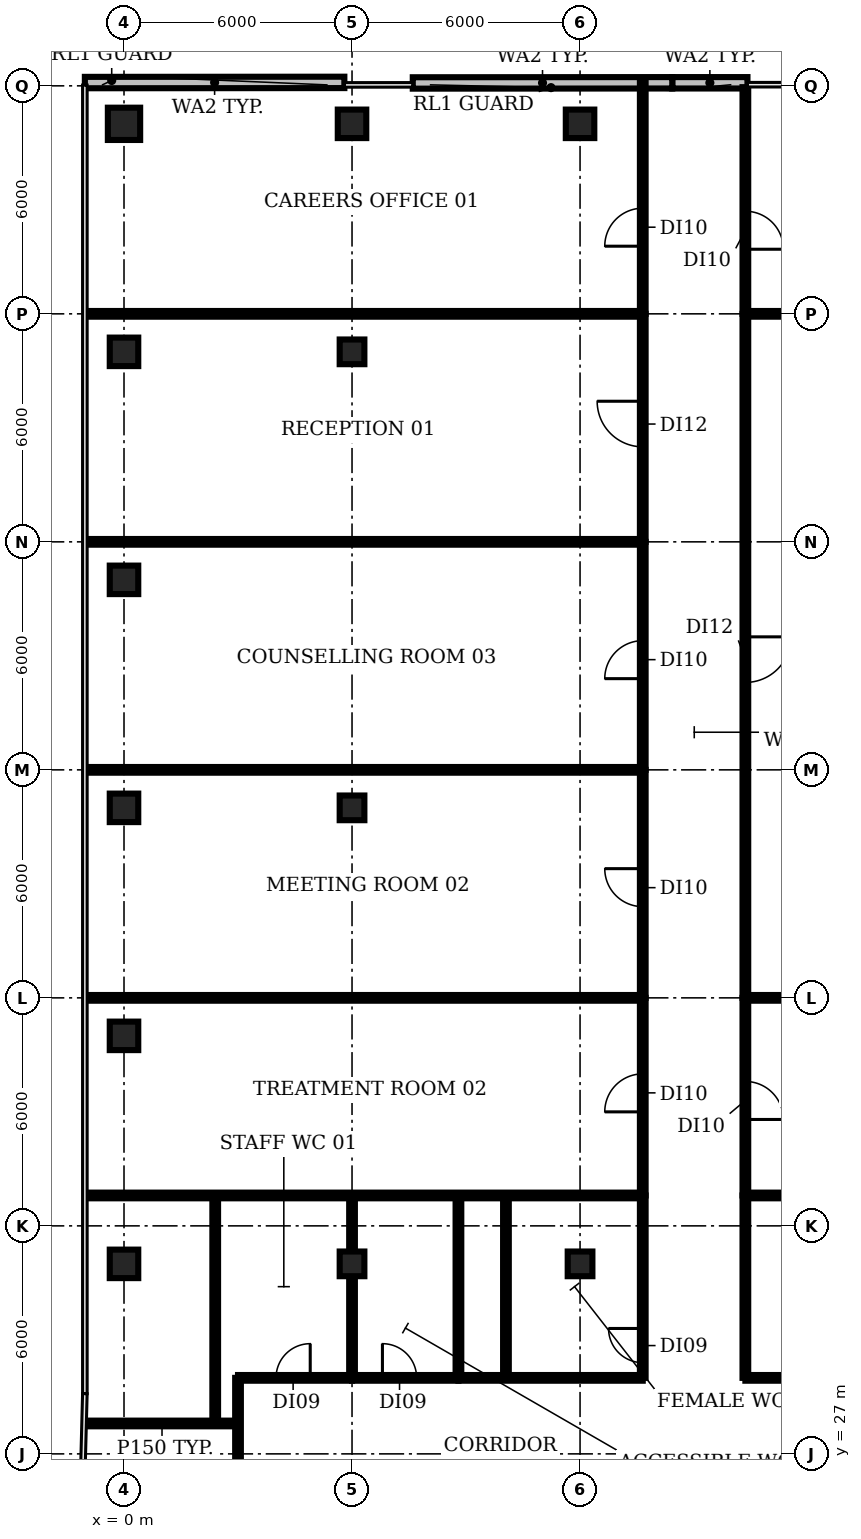
"""IFC4 building model, lengths in metres.
Left out: names, types, materials, properties, quantities, classifications, styles, units other than length and angle.
Written with IfcOpenShell. Run it as: python <this file> out.ifc"""

import sys

from ifc_helpers import new_model, si_unit, direction, frame, frame_2d, origin, origin_2d, place, context, subcontext, project, spatial, rectangle, circle, extrude, element, fill, save


model = new_model("IFC4")
c1 = context("Model", 3, precision=1e-05, world=origin(), true_north=direction((0.0, 1.0)))
c2 = subcontext(c1, "Body", "Model", "MODEL_VIEW")
j1 = project(units=[si_unit("LENGTHUNIT", "METRE"), si_unit("PLANEANGLEUNIT", "RADIAN")], contexts=[c1])
p1 = place(None, origin())
s1 = spatial("IfcSite", under=j1, at=p1, CompositionType="ELEMENT")
p2 = place(p1, origin())
s2 = spatial("IfcBuilding", under=s1, at=p2, CompositionType="ELEMENT")
p3 = place(p2, frame((0.0, 0.0, 281.0)))
s3 = spatial("IfcBuildingStorey", under=s2, at=p3, CompositionType="ELEMENT", Elevation=281.0)
for number, where, z_axis, x_axis in (
    (1, (0.0, 32.0, 0.0), (0.0, 0.0, 1.0), (1.0, 0.0, 0.0)),
    (2, (0.0, 38.0, 0.0), (0.0, 0.0, 1.0), (1.0, 0.0, 0.0)),
    (3, (0.0, 44.0, 0.0), (0.0, 0.0, 1.0), (1.0, 0.0, 0.0)),
    (4, (0.0, 50.0, 0.0), (0.0, 0.0, 1.0), (1.0, 0.0, 0.0)),
    (5, (0.0, 56.0, 0.0), (0.0, 0.0, 1.0), (1.0, 0.0, 0.0)),
):
    element("IfcColumn", number, at=place(p3, frame(where, z_axis=z_axis, x_axis=x_axis)), inside=s3, PredefinedType="COLUMN", context=c2, shape_type="SweptSolid", body=[
        extrude(rectangle(XDim=0.75, YDim=0.75, at=origin_2d()), origin(), (0.0, 0.0, 1.0), 3.85),
    ])
p4 = place(p3, frame((0.0, 62.0, 0.0), z_axis=(0.0, 0.0, 1.0), x_axis=(1.0, 0.0, 0.0)))
e6 = element("IfcColumn", 6, at=p4, inside=s3, PredefinedType="COLUMN", context=c2, shape_type="SweptSolid", body=[
    extrude(circle(Radius=0.425, at=origin_2d()), origin(), (0.0, 0.0, 1.0), 3.85),
])
for number, where, z_axis, x_axis in (
    (7, (6.0, 32.0, 0.0), (0.0, 0.0, 1.0), (1.0, 0.0, 0.0)),
    (8, (6.0, 44.0, 0.0), (0.0, 0.0, 1.0), (1.0, 0.0, 0.0)),
    (9, (6.0, 56.0, 0.0), (0.0, 0.0, 1.0), (1.0, 0.0, 0.0)),
):
    element("IfcColumn", number, at=place(p3, frame(where, z_axis=z_axis, x_axis=x_axis)), inside=s3, PredefinedType="COLUMN", context=c2, shape_type="SweptSolid", body=[
        extrude(rectangle(XDim=0.65, YDim=0.65, at=origin_2d()), origin(), (0.0, 0.0, 1.0), 3.85),
    ])
p5 = place(p3, frame((6.0, 62.0, 0.0), z_axis=(0.0, 0.0, 1.0), x_axis=(1.0, 0.0, 0.0)))
e10 = element("IfcColumn", 10, at=p5, inside=s3, PredefinedType="COLUMN", context=c2, shape_type="SweptSolid", body=[
    extrude(rectangle(XDim=0.75, YDim=0.75, at=origin_2d()), origin(), (0.0, 0.0, 1.0), 3.85),
])
p6 = place(p3, frame((12.0, 32.0, 0.0), z_axis=(0.0, 0.0, 1.0), x_axis=(1.0, 0.0, 0.0)))
e11 = element("IfcColumn", 11, at=p6, inside=s3, PredefinedType="COLUMN", context=c2, shape_type="SweptSolid", body=[
    extrude(rectangle(XDim=0.65, YDim=0.65, at=origin_2d()), origin(), (0.0, 0.0, 1.0), 3.85),
])
p7 = place(p3, frame((12.0, 62.0, 0.0), z_axis=(0.0, 0.0, 1.0), x_axis=(1.0, 0.0, 0.0)))
e12 = element("IfcColumn", 12, at=p7, inside=s3, PredefinedType="COLUMN", context=c2, shape_type="SweptSolid", body=[
    extrude(rectangle(XDim=0.75, YDim=0.75, at=origin_2d()), origin(), (0.0, 0.0, 1.0), 3.85),
])
p8 = place(p3, frame((16.405, 63.08, 0.0), z_axis=(0.0, 0.0, 1.0), x_axis=(-1.0, 0.0, 0.0)))
e13 = element("IfcWall", 13, at=p8, inside=s3, PredefinedType="SOLIDWALL", context=c2, shape_type="SweptSolid", body=[
    extrude(rectangle(XDim=1.979, YDim=0.3, at=frame_2d((0.989, 0.0))), origin(), (0.0, 0.0, 1.0), 3.85),
])
p9 = place(p3, frame((14.427, 63.08, 0.0), z_axis=(0.0, 0.0, 1.0), x_axis=(-0.999999792909, -0.000643569533, 0.0)))
e14 = element("IfcWall", 14, at=p9, inside=s3, PredefinedType="SOLIDWALL", context=c2, shape_type="SweptSolid", body=[
    extrude(rectangle(XDim=6.828, YDim=0.3, at=frame_2d((3.414, 0.0))), origin(), (0.0, 0.0, 1.0), 3.85),
])
p10 = place(p3, frame((5.798, 63.091, 0.0), z_axis=(0.0, 0.0, 1.0), x_axis=(-0.999999792894, -0.000643592544, 0.0)))
e15 = element("IfcWall", 15, at=p10, inside=s3, PredefinedType="SOLIDWALL", context=c2, shape_type="SweptSolid", body=[
    extrude(rectangle(XDim=6.828, YDim=0.3, at=frame_2d((3.414, 0.0))), origin(), (0.0, 0.0, 1.0), 3.85),
])
p11 = place(p3, frame((-1.0, 27.8, 0.0), z_axis=(0.0, 0.0, 1.0), x_axis=(1.0, 0.0, 0.0)))
e16 = element("IfcWall", 16, at=p11, inside=s3, PredefinedType="PARTITIONING", context=c2, shape_type="SweptSolid", body=[
    extrude(rectangle(XDim=4.0, YDim=0.15, at=frame_2d((2.0, 0.0))), origin(), (0.0, 0.0, 1.0), 2.9),
])
for number, where, z_axis, x_axis in (
    (17, (-0.98, 33.8, 0.0), (0.0, 0.0, 1.0), (1.0, 0.0, 0.0)),
    (18, (-0.98, 39.0, 0.0), (0.0, 0.0, 1.0), (1.0, 0.0, 0.0)),
    (19, (-0.98, 45.0, 0.0), (0.0, 0.0, 1.0), (1.0, 0.0, 0.0)),
    (20, (-0.98, 51.0, 0.0), (0.0, 0.0, 1.0), (1.0, 0.0, 0.0)),
    (21, (-0.98, 57.0, 0.0), (0.0, 0.0, 1.0), (1.0, 0.0, 0.0)),
):
    element("IfcWall", number, at=place(p3, frame(where, z_axis=z_axis, x_axis=x_axis)), inside=s3, PredefinedType="PARTITIONING", context=c2, shape_type="SweptSolid", body=[
        extrude(rectangle(XDim=14.63, YDim=0.15, at=frame_2d((7.315, 0.0))), origin(), (0.0, 0.0, 1.0), 2.9),
    ])
p12 = place(p3, frame((2.4, 27.8, 0.0), z_axis=(0.0, 0.0, 1.0), x_axis=(0.0, 1.0, 0.0)))
e22 = element("IfcWall", 22, at=p12, inside=s3, PredefinedType="PARTITIONING", context=c2, shape_type="SweptSolid", body=[
    extrude(rectangle(XDim=6.0, YDim=0.15, at=frame_2d((3.0, 0.0))), origin(), (0.0, 0.0, 1.0), 2.9),
])
p13 = place(p3, frame((3.0, 25.1, 0.0), z_axis=(0.0, 0.0, 1.0), x_axis=(0.0, 1.0, 0.0)))
e23 = element("IfcWall", 23, at=p13, inside=s3, PredefinedType="PARTITIONING", context=c2, shape_type="SweptSolid", body=[
    extrude(rectangle(XDim=3.9, YDim=0.15, at=frame_2d((1.95, 0.0))), origin(), (0.0, 0.0, 1.0), 2.9),
])
p14 = place(p3, frame((3.0, 29.0, 0.0), z_axis=(0.0, 0.0, 1.0), x_axis=(1.0, 0.0, 0.0)))
e24 = element("IfcWall", 24, at=p14, inside=s3, PredefinedType="PARTITIONING", context=c2, shape_type="SweptSolid", body=[
    extrude(rectangle(XDim=3.0, YDim=0.15, at=frame_2d((1.5, 0.0))), origin(), (0.0, 0.0, 1.0), 2.9),
])
p15 = place(p14, frame((1.0, 0.0, 0.0)))
e25 = element("IfcOpeningElement", 25, at=p15, cuts=e24, PredefinedType="OPENING", context=c2, shape_type="SweptSolid", body=[
    extrude(rectangle(XDim=0.9, YDim=2.1, at=frame_2d((0.45, 1.05))), frame((0.0, 0.085, 0.0), z_axis=(0.0, -1.0, 0.0), x_axis=(1.0, 0.0, 0.0)), (0.0, 0.0, 1.0), 0.17),
])
p16 = place(p3, frame((6.0, 29.0, 0.0), z_axis=(0.0, 0.0, 1.0), x_axis=(0.0, 1.0, 0.0)))
e26 = element("IfcWall", 26, at=p16, inside=s3, PredefinedType="PARTITIONING", context=c2, shape_type="SweptSolid", body=[
    extrude(rectangle(XDim=4.8, YDim=0.15, at=frame_2d((2.4, 0.0))), origin(), (0.0, 0.0, 1.0), 2.9),
])
p17 = place(p3, frame((6.0, 29.0, 0.0), z_axis=(0.0, 0.0, 1.0), x_axis=(1.0, 0.0, 0.0)))
e27 = element("IfcWall", 27, at=p17, inside=s3, PredefinedType="PARTITIONING", context=c2, shape_type="SweptSolid", body=[
    extrude(rectangle(XDim=2.8, YDim=0.15, at=frame_2d((1.4, 0.0))), origin(), (0.0, 0.0, 1.0), 2.9),
])
p18 = place(p17, frame((0.8, 0.0, 0.0)))
e28 = element("IfcOpeningElement", 28, at=p18, cuts=e27, PredefinedType="OPENING", context=c2, shape_type="SweptSolid", body=[
    extrude(rectangle(XDim=0.9, YDim=2.1, at=frame_2d((0.45, 1.05))), frame((0.0, 0.085, 0.0), z_axis=(0.0, -1.0, 0.0), x_axis=(1.0, 0.0, 0.0)), (0.0, 0.0, 1.0), 0.17),
])
p19 = place(p3, frame((8.8, 29.0, 0.0), z_axis=(0.0, 0.0, 1.0), x_axis=(0.0, 1.0, 0.0)))
e29 = element("IfcWall", 29, at=p19, inside=s3, PredefinedType="PARTITIONING", context=c2, shape_type="SweptSolid", body=[
    extrude(rectangle(XDim=4.8, YDim=0.15, at=frame_2d((2.4, 0.0))), origin(), (0.0, 0.0, 1.0), 2.9),
])
p20 = place(p3, frame((8.8, 29.0, 0.0), z_axis=(0.0, 0.0, 1.0), x_axis=(1.0, 0.0, 0.0)))
e30 = element("IfcWall", 30, at=p20, inside=s3, PredefinedType="PARTITIONING", context=c2, shape_type="SweptSolid", body=[
    extrude(rectangle(XDim=4.85, YDim=0.15, at=frame_2d((2.425, 0.0))), origin(), (0.0, 0.0, 1.0), 2.9),
])
p21 = place(p3, frame((10.05, 29.0, 0.0), z_axis=(0.0, 0.0, 1.0), x_axis=(0.0, 1.0, 0.0)))
e31 = element("IfcWall", 31, at=p21, inside=s3, PredefinedType="PARTITIONING", context=c2, shape_type="SweptSolid", body=[
    extrude(rectangle(XDim=4.8, YDim=0.15, at=frame_2d((2.4, 0.0))), origin(), (0.0, 0.0, 1.0), 2.9),
])
p22 = place(p3, frame((13.65, 29.0, 0.0), z_axis=(0.0, 0.0, 1.0), x_axis=(0.0, 1.0, 0.0)))
e32 = element("IfcWall", 32, at=p22, inside=s3, PredefinedType="PARTITIONING", context=c2, shape_type="SweptSolid", body=[
    extrude(rectangle(XDim=4.8, YDim=0.15, at=frame_2d((2.4, 0.0))), origin(), (0.0, 0.0, 1.0), 2.9),
])
p23 = place(p22, frame((0.4, 0.0, 0.0)))
e33 = element("IfcOpeningElement", 33, at=p23, cuts=e32, PredefinedType="OPENING", context=c2, shape_type="SweptSolid", body=[
    extrude(rectangle(XDim=0.9, YDim=2.1, at=frame_2d((0.45, 1.05))), frame((0.0, 0.085, 0.0), z_axis=(0.0, -1.0, 0.0), x_axis=(1.0, 0.0, 0.0)), (0.0, 0.0, 1.0), 0.17),
])
p24 = place(p3, frame((13.65, 33.8, 0.0), z_axis=(0.0, 0.0, 1.0), x_axis=(0.0, 1.0, 0.0)))
e34 = element("IfcWall", 34, at=p24, inside=s3, PredefinedType="PARTITIONING", context=c2, shape_type="SweptSolid", body=[
    extrude(rectangle(XDim=5.2, YDim=0.15, at=frame_2d((2.6, 0.0))), origin(), (0.0, 0.0, 1.0), 2.9),
])
p25 = place(p24, frame((2.2, 0.0, 0.0)))
e35 = element("IfcOpeningElement", 35, at=p25, cuts=e34, PredefinedType="OPENING", context=c2, shape_type="SweptSolid", body=[
    extrude(rectangle(XDim=1.0, YDim=2.1, at=frame_2d((0.5, 1.05))), frame((0.0, 0.085, 0.0), z_axis=(0.0, -1.0, 0.0), x_axis=(1.0, 0.0, 0.0)), (0.0, 0.0, 1.0), 0.17),
])
p26 = place(p3, frame((13.65, 39.0, 0.0), z_axis=(0.0, 0.0, 1.0), x_axis=(0.0, 1.0, 0.0)))
e36 = element("IfcWall", 36, at=p26, inside=s3, PredefinedType="PARTITIONING", context=c2, shape_type="SweptSolid", body=[
    extrude(rectangle(XDim=6.0, YDim=0.15, at=frame_2d((3.0, 0.0))), origin(), (0.0, 0.0, 1.0), 2.9),
])
p27 = place(p26, frame((2.4, 0.0, 0.0)))
e37 = element("IfcOpeningElement", 37, at=p27, cuts=e36, PredefinedType="OPENING", context=c2, shape_type="SweptSolid", body=[
    extrude(rectangle(XDim=1.0, YDim=2.1, at=frame_2d((0.5, 1.05))), frame((0.0, 0.085, 0.0), z_axis=(0.0, -1.0, 0.0), x_axis=(1.0, 0.0, 0.0)), (0.0, 0.0, 1.0), 0.17),
])
p28 = place(p3, frame((13.65, 45.0, 0.0), z_axis=(0.0, 0.0, 1.0), x_axis=(0.0, 1.0, 0.0)))
e38 = element("IfcWall", 38, at=p28, inside=s3, PredefinedType="PARTITIONING", context=c2, shape_type="SweptSolid", body=[
    extrude(rectangle(XDim=6.0, YDim=0.15, at=frame_2d((3.0, 0.0))), origin(), (0.0, 0.0, 1.0), 2.9),
])
p29 = place(p28, frame((2.4, 0.0, 0.0)))
e39 = element("IfcOpeningElement", 39, at=p29, cuts=e38, PredefinedType="OPENING", context=c2, shape_type="SweptSolid", body=[
    extrude(rectangle(XDim=1.0, YDim=2.1, at=frame_2d((0.5, 1.05))), frame((0.0, 0.085, 0.0), z_axis=(0.0, -1.0, 0.0), x_axis=(1.0, 0.0, 0.0)), (0.0, 0.0, 1.0), 0.17),
])
p30 = place(p3, frame((13.65, 51.0, 0.0), z_axis=(0.0, 0.0, 1.0), x_axis=(0.0, 1.0, 0.0)))
e40 = element("IfcWall", 40, at=p30, inside=s3, PredefinedType="PARTITIONING", context=c2, shape_type="SweptSolid", body=[
    extrude(rectangle(XDim=6.0, YDim=0.15, at=frame_2d((3.0, 0.0))), origin(), (0.0, 0.0, 1.0), 2.9),
])
p31 = place(p30, frame((2.5, 0.0, 0.0)))
e41 = element("IfcOpeningElement", 41, at=p31, cuts=e40, PredefinedType="OPENING", context=c2, shape_type="SweptSolid", body=[
    extrude(rectangle(XDim=1.2, YDim=2.1, at=frame_2d((0.6, 1.05))), frame((0.0, 0.085, 0.0), z_axis=(0.0, -1.0, 0.0), x_axis=(1.0, 0.0, 0.0)), (0.0, 0.0, 1.0), 0.17),
])
p32 = place(p3, frame((13.65, 57.0, 0.0), z_axis=(0.0, 0.0, 1.0), x_axis=(0.0, 1.0, 0.0)))
e42 = element("IfcWall", 42, at=p32, inside=s3, PredefinedType="PARTITIONING", context=c2, shape_type="SweptSolid", body=[
    extrude(rectangle(XDim=6.09, YDim=0.15, at=frame_2d((3.045, 0.0))), origin(), (0.0, 0.0, 1.0), 2.9),
])
p33 = place(p32, frame((1.78, 0.0, 0.0)))
e43 = element("IfcOpeningElement", 43, at=p33, cuts=e42, PredefinedType="OPENING", context=c2, shape_type="SweptSolid", body=[
    extrude(rectangle(XDim=1.0, YDim=2.1, at=frame_2d((0.5, 1.05))), frame((0.0, 0.085, 0.0), z_axis=(0.0, -1.0, 0.0), x_axis=(1.0, 0.0, 0.0)), (0.0, 0.0, 1.0), 0.17),
])
p34 = place(p3, frame((16.35, 29.0, 0.0), z_axis=(0.0, 0.0, 1.0), x_axis=(0.0, 1.0, 0.0)))
e44 = element("IfcWall", 44, at=p34, inside=s3, PredefinedType="PARTITIONING", context=c2, shape_type="SweptSolid", body=[
    extrude(rectangle(XDim=4.8, YDim=0.15, at=frame_2d((2.4, 0.0))), origin(), (0.0, 0.0, 1.0), 2.9),
])
p35 = place(p3, frame((16.35, 29.0, 0.0), z_axis=(0.0, 0.0, 1.0), x_axis=(1.0, 0.0, 0.0)))
e45 = element("IfcWall", 45, at=p35, inside=s3, PredefinedType="PARTITIONING", context=c2, shape_type="SweptSolid", body=[
    extrude(rectangle(XDim=5.18, YDim=0.15, at=frame_2d((2.59, 0.0))), origin(), (0.0, 0.0, 1.0), 2.9),
])
p36 = place(p3, frame((16.35, 33.8, 0.0), z_axis=(0.0, 0.0, 1.0), x_axis=(1.0, 0.0, 0.0)))
e46 = element("IfcWall", 46, at=p36, inside=s3, PredefinedType="PARTITIONING", context=c2, shape_type="SweptSolid", body=[
    extrude(rectangle(XDim=8.78, YDim=0.15, at=frame_2d((4.39, 0.0))), origin(), (0.0, 0.0, 1.0), 2.9),
])
p37 = place(p3, frame((16.35, 39.0, 0.0), z_axis=(0.0, 0.0, 1.0), x_axis=(0.0, -1.0, 0.0)))
e47 = element("IfcWall", 47, at=p37, inside=s3, PredefinedType="PARTITIONING", context=c2, shape_type="SweptSolid", body=[
    extrude(rectangle(XDim=5.2, YDim=0.15, at=frame_2d((2.6, 0.0))), origin(), (0.0, 0.0, 1.0), 2.9),
])
p38 = place(p37, frame((2.2, 0.0, 0.0)))
e48 = element("IfcOpeningElement", 48, at=p38, cuts=e47, PredefinedType="OPENING", context=c2, shape_type="SweptSolid", body=[
    extrude(rectangle(XDim=1.0, YDim=2.1, at=frame_2d((0.5, 1.05))), frame((0.0, 0.085, 0.0), z_axis=(0.0, -1.0, 0.0), x_axis=(1.0, 0.0, 0.0)), (0.0, 0.0, 1.0), 0.17),
])
p39 = place(p3, frame((16.35, 39.0, 0.0), z_axis=(0.0, 0.0, 1.0), x_axis=(1.0, 0.0, 0.0)))
e49 = element("IfcWall", 49, at=p39, inside=s3, PredefinedType="PARTITIONING", context=c2, shape_type="SweptSolid", body=[
    extrude(rectangle(XDim=8.91, YDim=0.15, at=frame_2d((4.455, 0.0))), origin(), (0.0, 0.0, 1.0), 2.9),
])
p40 = place(p3, frame((16.35, 57.0, 0.0), z_axis=(0.0, 0.0, 1.0), x_axis=(0.0, -1.0, 0.0)))
e50 = element("IfcWall", 50, at=p40, inside=s3, PredefinedType="PARTITIONING", context=c2, shape_type="SweptSolid", body=[
    extrude(rectangle(XDim=18.0, YDim=0.15, at=frame_2d((9.0, 0.0))), origin(), (0.0, 0.0, 1.0), 2.9),
])
p41 = place(p40, frame((8.5, 0.0, 0.0)))
e51 = element("IfcOpeningElement", 51, at=p41, cuts=e50, PredefinedType="OPENING", context=c2, shape_type="SweptSolid", body=[
    extrude(rectangle(XDim=1.2, YDim=2.1, at=frame_2d((0.6, 1.05))), frame((0.0, 0.085, 0.0), z_axis=(0.0, -1.0, 0.0), x_axis=(1.0, 0.0, 0.0)), (0.0, 0.0, 1.0), 0.17),
])
p42 = place(p3, frame((16.35, 57.0, 0.0), z_axis=(0.0, 0.0, 1.0), x_axis=(1.0, 0.0, 0.0)))
e52 = element("IfcWall", 52, at=p42, inside=s3, PredefinedType="PARTITIONING", context=c2, shape_type="SweptSolid", body=[
    extrude(rectangle(XDim=9.38, YDim=0.15, at=frame_2d((4.69, 0.0))), origin(), (0.0, 0.0, 1.0), 2.9),
])
p43 = place(p3, frame((16.35, 62.965, 0.0), z_axis=(0.0, 0.0, 1.0), x_axis=(0.0, -1.0, 0.0)))
e53 = element("IfcWall", 53, at=p43, inside=s3, PredefinedType="PARTITIONING", context=c2, shape_type="SweptSolid", body=[
    extrude(rectangle(XDim=5.965, YDim=0.15, at=frame_2d((2.982, 0.0))), origin(), (0.0, 0.0, 1.0), 2.9),
])
p44 = place(p43, frame((3.265, 0.0, 0.0)))
e54 = element("IfcOpeningElement", 54, at=p44, cuts=e53, PredefinedType="OPENING", context=c2, shape_type="SweptSolid", body=[
    extrude(rectangle(XDim=1.0, YDim=2.1, at=frame_2d((0.5, 1.05))), frame((0.0, 0.085, 0.0), z_axis=(0.0, -1.0, 0.0), x_axis=(1.0, 0.0, 0.0)), (0.0, 0.0, 1.0), 0.17),
])
p45 = place(p15, origin())
e55 = element("IfcDoor", 55, at=p45, inside=s3, OperationType="SINGLE_SWING_RIGHT", PredefinedType="DOOR", context=c2, shape_type="SweptSolid", body=[
    extrude(rectangle(XDim=0.9, YDim=2.1, at=frame_2d((0.45, 1.05))), frame((0.0, 0.025, 0.0), z_axis=(0.0, -1.0, 0.0), x_axis=(1.0, 0.0, 0.0)), (0.0, 0.0, 1.0), 0.05),
])
fill(e25, e55)
p46 = place(p18, origin())
e56 = element("IfcDoor", 56, at=p46, inside=s3, OperationType="SINGLE_SWING_LEFT", PredefinedType="DOOR", context=c2, shape_type="SweptSolid", body=[
    extrude(rectangle(XDim=0.9, YDim=2.1, at=frame_2d((0.45, 1.05))), frame((0.0, 0.025, 0.0), z_axis=(0.0, -1.0, 0.0), x_axis=(1.0, 0.0, 0.0)), (0.0, 0.0, 1.0), 0.05),
])
fill(e28, e56)
p47 = place(p23, origin())
e57 = element("IfcDoor", 57, at=p47, inside=s3, OperationType="SINGLE_SWING_RIGHT", PredefinedType="DOOR", context=c2, shape_type="SweptSolid", body=[
    extrude(rectangle(XDim=0.9, YDim=2.1, at=frame_2d((0.45, 1.05))), frame((0.0, 0.025, 0.0), z_axis=(0.0, -1.0, 0.0), x_axis=(1.0, 0.0, 0.0)), (0.0, 0.0, 1.0), 0.05),
])
fill(e33, e57)
p48 = place(p25, origin())
e58 = element("IfcDoor", 58, at=p48, inside=s3, OperationType="SINGLE_SWING_LEFT", PredefinedType="DOOR", context=c2, shape_type="SweptSolid", body=[
    extrude(rectangle(XDim=1.0, YDim=2.1, at=frame_2d((0.5, 1.05))), frame((0.0, 0.025, 0.0), z_axis=(0.0, -1.0, 0.0), x_axis=(1.0, 0.0, 0.0)), (0.0, 0.0, 1.0), 0.05),
])
fill(e35, e58)
p49 = place(p27, origin())
e59 = element("IfcDoor", 59, at=p49, inside=s3, OperationType="SINGLE_SWING_RIGHT", PredefinedType="DOOR", context=c2, shape_type="SweptSolid", body=[
    extrude(rectangle(XDim=1.0, YDim=2.1, at=frame_2d((0.5, 1.05))), frame((0.0, 0.025, 0.0), z_axis=(0.0, -1.0, 0.0), x_axis=(1.0, 0.0, 0.0)), (0.0, 0.0, 1.0), 0.05),
])
fill(e37, e59)
p50 = place(p29, origin())
e60 = element("IfcDoor", 60, at=p50, inside=s3, OperationType="SINGLE_SWING_LEFT", PredefinedType="DOOR", context=c2, shape_type="SweptSolid", body=[
    extrude(rectangle(XDim=1.0, YDim=2.1, at=frame_2d((0.5, 1.05))), frame((0.0, 0.025, 0.0), z_axis=(0.0, -1.0, 0.0), x_axis=(1.0, 0.0, 0.0)), (0.0, 0.0, 1.0), 0.05),
])
fill(e39, e60)
p51 = place(p31, origin())
e61 = element("IfcDoor", 61, at=p51, inside=s3, OperationType="SINGLE_SWING_RIGHT", PredefinedType="DOOR", context=c2, shape_type="SweptSolid", body=[
    extrude(rectangle(XDim=1.2, YDim=2.1, at=frame_2d((0.6, 1.05))), frame((0.0, 0.025, 0.0), z_axis=(0.0, -1.0, 0.0), x_axis=(1.0, 0.0, 0.0)), (0.0, 0.0, 1.0), 0.05),
])
fill(e41, e61)
p52 = place(p33, origin())
e62 = element("IfcDoor", 62, at=p52, inside=s3, OperationType="SINGLE_SWING_LEFT", PredefinedType="DOOR", context=c2, shape_type="SweptSolid", body=[
    extrude(rectangle(XDim=1.0, YDim=2.1, at=frame_2d((0.5, 1.05))), frame((0.0, 0.025, 0.0), z_axis=(0.0, -1.0, 0.0), x_axis=(1.0, 0.0, 0.0)), (0.0, 0.0, 1.0), 0.05),
])
fill(e43, e62)
p53 = place(p38, origin())
e63 = element("IfcDoor", 63, at=p53, inside=s3, OperationType="SINGLE_SWING_RIGHT", PredefinedType="DOOR", context=c2, shape_type="SweptSolid", body=[
    extrude(rectangle(XDim=1.0, YDim=2.1, at=frame_2d((0.5, 1.05))), frame((0.0, 0.025, 0.0), z_axis=(0.0, -1.0, 0.0), x_axis=(1.0, 0.0, 0.0)), (0.0, 0.0, 1.0), 0.05),
])
fill(e48, e63)
p54 = place(p41, origin())
e64 = element("IfcDoor", 64, at=p54, inside=s3, OperationType="SINGLE_SWING_LEFT", PredefinedType="DOOR", context=c2, shape_type="SweptSolid", body=[
    extrude(rectangle(XDim=1.2, YDim=2.1, at=frame_2d((0.6, 1.05))), frame((0.0, 0.025, 0.0), z_axis=(0.0, -1.0, 0.0), x_axis=(1.0, 0.0, 0.0)), (0.0, 0.0, 1.0), 0.05),
])
fill(e51, e64)
p55 = place(p44, origin())
e65 = element("IfcDoor", 65, at=p55, inside=s3, OperationType="SINGLE_SWING_RIGHT", PredefinedType="DOOR", context=c2, shape_type="SweptSolid", body=[
    extrude(rectangle(XDim=1.0, YDim=2.1, at=frame_2d((0.5, 1.05))), frame((0.0, 0.025, 0.0), z_axis=(0.0, -1.0, 0.0), x_axis=(1.0, 0.0, 0.0)), (0.0, 0.0, 1.0), 0.05),
])
fill(e54, e65)
save(model, sys.argv[1])
